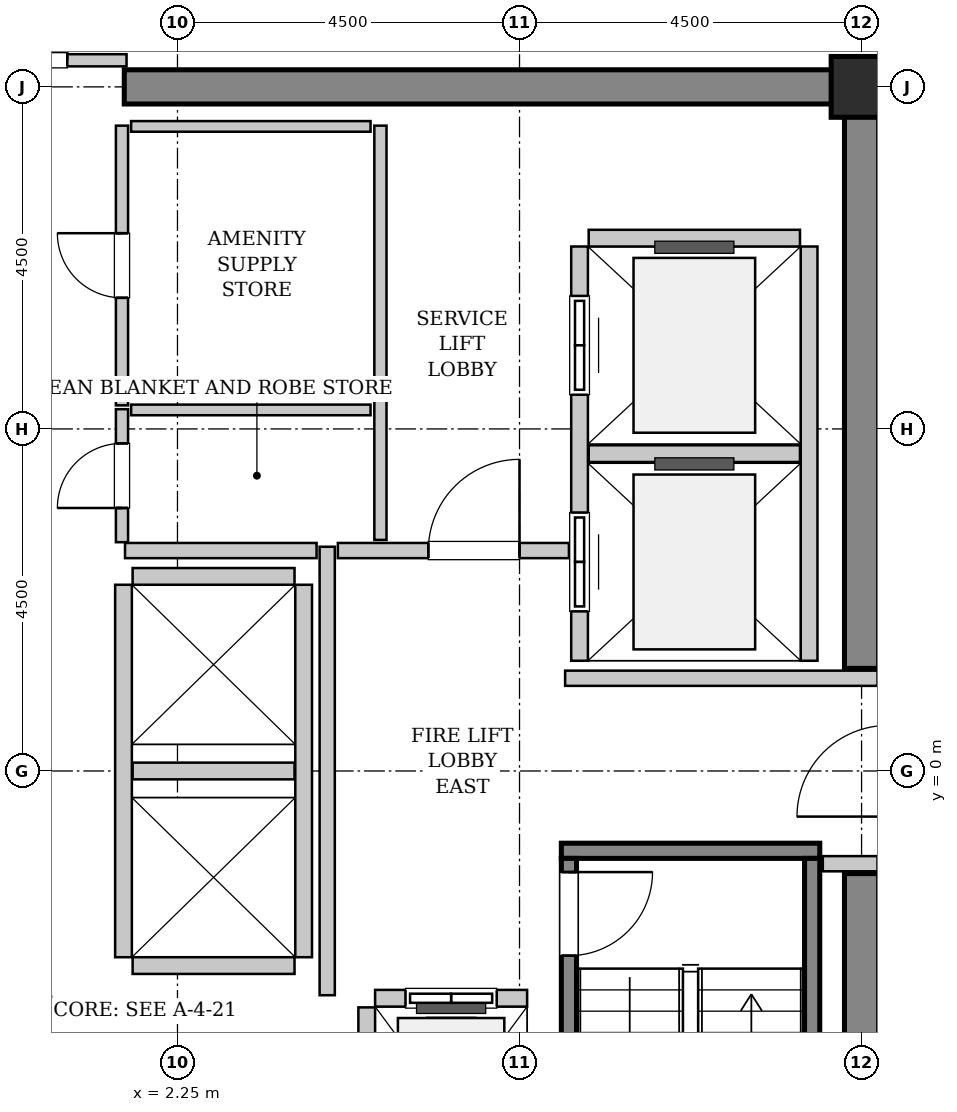
"""IFC4 building model, lengths in metres.
Left out: names, types, materials, properties, quantities, classifications, styles, units other than length and angle.
Written with IfcOpenShell. Run it as: python <this file> out.ifc"""

import sys

from ifc_helpers import new_model, si_unit, direction, frame, frame_2d, origin, origin_2d, place, context, subcontext, project, spatial, rectangle, hollow_rectangle, extrude, source, transform, mapped, element, fill, save


model = new_model("IFC4")
c1 = context("Model", 3, precision=1e-05, world=origin(), true_north=direction((0.0, 1.0)))
c2 = subcontext(c1, "Body", "Model", "MODEL_VIEW")
j1 = project(units=[si_unit("LENGTHUNIT", "METRE"), si_unit("PLANEANGLEUNIT", "RADIAN")], contexts=[c1])
p1 = place(None, origin())
s1 = spatial("IfcSite", under=j1, at=p1, CompositionType="ELEMENT")
p2 = place(p1, origin())
s2 = spatial("IfcBuilding", under=s1, at=p2, CompositionType="ELEMENT")
p3 = place(p2, frame((0.0, 0.0, 264.6)))
s3 = spatial("IfcBuildingStorey", under=s2, at=p3, CompositionType="ELEMENT", Elevation=264.6)
m1 = source(origin(), c2, "Body", "SweptSolid", [
    extrude(rectangle(XDim=9.925, YDim=0.45, at=frame_2d((4.962, 0.0))), origin(), (0.0, 0.0, 1.0), 3.8),
])
p4 = place(p3, frame((1.55, 9.0, 0.0), z_axis=(0.0, 0.0, 1.0), x_axis=(1.0, 0.0, 0.0)))
e1 = element("IfcWall", 1, at=p4, inside=s3, PredefinedType="SHEAR", context=c2, shape_type="MappedRepresentation", body=[
    mapped(m1, transform((0.0, 0.0, 0.0), x_axis=(1.0, 0.0, 0.0), y_axis=(0.0, 1.0, 0.0), z_axis=(0.0, 0.0, 1.0), scale=1.0)),
])
m2 = source(origin(), c2, "Body", "SweptSolid", [
    extrude(rectangle(XDim=7.425, YDim=0.45, at=frame_2d((3.712, 0.0))), origin(), (0.0, 0.0, 1.0), 3.8),
])
for number, where, z_axis, x_axis in (
    (2, (11.25, -8.775, 0.0), (0.0, 0.0, 1.0), (0.0, 1.0, 0.0)),
    (3, (11.25, 1.35, 0.0), (0.0, 0.0, 1.0), (0.0, 1.0, 0.0)),
):
    element("IfcWall", number, at=place(p3, frame(where, z_axis=z_axis, x_axis=x_axis)), inside=s3, PredefinedType="SHEAR", context=c2, shape_type="MappedRepresentation", body=[
        mapped(m2, transform((0.0, 0.0, 0.0), x_axis=(1.0, 0.0, 0.0), y_axis=(0.0, 1.0, 0.0), z_axis=(0.0, 0.0, 1.0), scale=1.0)),
    ])
m3 = source(origin(), c2, "Body", "SweptSolid", [
    extrude(hollow_rectangle(XDim=0.8, YDim=0.8, WallThickness=0.04, InnerFilletRadius=0.04, OuterFilletRadius=0.08, at=origin_2d()), origin(), (0.0, 0.0, 1.0), 3.8),
])
p5 = place(p3, frame((11.25, 9.0, 0.0), z_axis=(0.0, 0.0, 1.0), x_axis=(1.0, 0.0, 0.0)))
e4 = element("IfcColumn", 4, at=p5, inside=s3, PredefinedType="COLUMN", context=c2, shape_type="MappedRepresentation", body=[
    mapped(m3, transform((0.0, 0.0, 0.0), x_axis=(1.0, 0.0, 0.0), y_axis=(0.0, 1.0, 0.0), z_axis=(0.0, 0.0, 1.0), scale=1.0)),
])
m4 = source(origin(), c2, "Body", "SweptSolid", [
    extrude(rectangle(XDim=3.4, YDim=0.2, at=frame_2d((1.7, 0.0))), origin(), (0.0, 0.0, 1.0), 3.8),
])
p6 = place(p3, frame((7.3, -1.05, 0.0), z_axis=(0.0, 0.0, 1.0), x_axis=(1.0, 0.0, 0.0)))
e5 = element("IfcWall", 5, at=p6, inside=s3, PredefinedType="SOLIDWALL", context=c2, shape_type="MappedRepresentation", body=[
    mapped(m4, transform((0.0, 0.0, 0.0), x_axis=(1.0, 0.0, 0.0), y_axis=(0.0, 1.0, 0.0), z_axis=(0.0, 0.0, 1.0), scale=1.0)),
])
m5 = source(origin(), c2, "Body", "SweptSolid", [
    extrude(rectangle(XDim=7.1, YDim=0.2, at=frame_2d((3.55, 0.0))), origin(), (0.0, 0.0, 1.0), 3.8),
])
p7 = place(p3, frame((7.4, -1.15, 0.0), z_axis=(0.0, 0.0, 1.0), x_axis=(0.0, -1.0, 0.0)))
e6 = element("IfcWall", 6, at=p7, inside=s3, PredefinedType="SOLIDWALL", context=c2, shape_type="MappedRepresentation", body=[
    mapped(m5, transform((0.0, 0.0, 0.0), x_axis=(1.0, 0.0, 0.0), y_axis=(0.0, 1.0, 0.0), z_axis=(0.0, 0.0, 1.0), scale=1.0)),
])
p8 = place(p7, frame((0.18, 0.0, 0.0)))
e7 = element("IfcOpeningElement", 7, at=p8, cuts=e6, PredefinedType="OPENING", context=c2, shape_type="SweptSolid", body=[
    extrude(rectangle(XDim=1.1, YDim=2.15, at=frame_2d((0.55, 1.075))), frame((0.0, 0.11, 0.0), z_axis=(0.0, -1.0, 0.0), x_axis=(1.0, 0.0, 0.0)), (0.0, 0.0, 1.0), 0.22),
])
p9 = place(p3, frame((10.6, -1.15, 0.0), z_axis=(0.0, 0.0, 1.0), x_axis=(0.0, -1.0, 0.0)))
e8 = element("IfcWall", 8, at=p9, inside=s3, PredefinedType="SOLIDWALL", context=c2, shape_type="MappedRepresentation", body=[
    mapped(m5, transform((0.0, 0.0, 0.0), x_axis=(1.0, 0.0, 0.0), y_axis=(0.0, 1.0, 0.0), z_axis=(0.0, 0.0, 1.0), scale=1.0)),
])
m6 = source(origin(), c2, "Body", "SweptSolid", [
    extrude(rectangle(XDim=2.0, YDim=0.22, at=frame_2d((1.0, 0.0))), origin(), (0.0, 0.0, 1.0), 3.535),
])
p10 = place(p3, frame((6.85, -2.99, 0.0), z_axis=(0.0, 0.0, 1.0), x_axis=(-1.0, 0.0, 0.0)))
e9 = element("IfcWall", 9, at=p10, inside=s3, PredefinedType="SOLIDWALL", context=c2, shape_type="MappedRepresentation", body=[
    mapped(m6, transform((0.0, 0.0, 0.0), x_axis=(1.0, 0.0, 0.0), y_axis=(0.0, 1.0, 0.0), z_axis=(0.0, 0.0, 1.0), scale=1.0)),
])
p11 = place(p10, frame((0.4, 0.0, 0.0)))
e10 = element("IfcOpeningElement", 10, at=p11, cuts=e9, PredefinedType="OPENING", context=c2, shape_type="SweptSolid", body=[
    extrude(rectangle(XDim=1.2, YDim=2.2, at=frame_2d((0.6, 1.1))), frame((0.0, 0.12, 0.0), z_axis=(0.0, -1.0, 0.0), x_axis=(1.0, 0.0, 0.0)), (0.0, 0.0, 1.0), 0.24),
])
m7 = source(origin(), c2, "Body", "SweptSolid", [
    extrude(rectangle(XDim=2.68, YDim=0.22, at=frame_2d((1.34, 0.0))), origin(), (0.0, 0.0, 1.0), 3.535),
])
p12 = place(p3, frame((4.74, -3.11, 0.0), z_axis=(0.0, 0.0, 1.0), x_axis=(0.0, -1.0, 0.0)))
e11 = element("IfcWall", 11, at=p12, inside=s3, PredefinedType="SOLIDWALL", context=c2, shape_type="MappedRepresentation", body=[
    mapped(m7, transform((0.0, 0.0, 0.0), x_axis=(1.0, 0.0, 0.0), y_axis=(0.0, 1.0, 0.0), z_axis=(0.0, 0.0, 1.0), scale=1.0)),
])
m8 = source(origin(), c2, "Body", "SweptSolid", [
    extrude(rectangle(XDim=5.45, YDim=0.22, at=frame_2d((2.725, 0.0))), origin(), (0.0, 0.0, 1.0), 3.535),
])
p13 = place(p3, frame((7.54, 6.9, 0.0), z_axis=(0.0, 0.0, 1.0), x_axis=(0.0, -1.0, 0.0)))
e12 = element("IfcWall", 12, at=p13, inside=s3, PredefinedType="SOLIDWALL", context=c2, shape_type="MappedRepresentation", body=[
    mapped(m8, transform((0.0, 0.0, 0.0), x_axis=(1.0, 0.0, 0.0), y_axis=(0.0, 1.0, 0.0), z_axis=(0.0, 0.0, 1.0), scale=1.0)),
])
p14 = place(p13, frame((3.5, 0.0, 0.0)))
e13 = element("IfcOpeningElement", 13, at=p14, cuts=e12, PredefinedType="OPENING", context=c2, shape_type="SweptSolid", body=[
    extrude(rectangle(XDim=1.3, YDim=2.3, at=frame_2d((0.65, 1.15))), frame((0.0, 0.12, 0.0), z_axis=(0.0, -1.0, 0.0), x_axis=(1.0, 0.0, 0.0)), (0.0, 0.0, 1.0), 0.24),
])
p15 = place(p13, frame((0.65, 0.0, 0.0)))
e14 = element("IfcOpeningElement", 14, at=p15, cuts=e12, PredefinedType="OPENING", context=c2, shape_type="SweptSolid", body=[
    extrude(rectangle(XDim=1.3, YDim=2.3, at=frame_2d((0.65, 1.15))), frame((0.0, 0.12, 0.0), z_axis=(0.0, -1.0, 0.0), x_axis=(1.0, 0.0, 0.0)), (0.0, 0.0, 1.0), 0.24),
])
p16 = place(p3, frame((10.56, 1.45, 0.0), z_axis=(0.0, 0.0, 1.0), x_axis=(0.0, 1.0, 0.0)))
e15 = element("IfcWall", 15, at=p16, inside=s3, PredefinedType="SOLIDWALL", context=c2, shape_type="MappedRepresentation", body=[
    mapped(m8, transform((0.0, 0.0, 0.0), x_axis=(1.0, 0.0, 0.0), y_axis=(0.0, 1.0, 0.0), z_axis=(0.0, 0.0, 1.0), scale=1.0)),
])
m9 = source(origin(), c2, "Body", "SweptSolid", [
    extrude(rectangle(XDim=2.78, YDim=0.22, at=frame_2d((1.39, 0.0))), origin(), (0.0, 0.0, 1.0), 3.535),
])
for number, where, z_axis, x_axis in (
    (16, (7.66, 4.175, 0.0), (0.0, 0.0, 1.0), (1.0, 0.0, 0.0)),
    (17, (10.44, 7.01, 0.0), (0.0, 0.0, 1.0), (-1.0, 0.0, 0.0)),
):
    element("IfcWall", number, at=place(p3, frame(where, z_axis=z_axis, x_axis=x_axis)), inside=s3, PredefinedType="SOLIDWALL", context=c2, shape_type="MappedRepresentation", body=[
        mapped(m9, transform((0.0, 0.0, 0.0), x_axis=(1.0, 0.0, 0.0), y_axis=(0.0, 1.0, 0.0), z_axis=(0.0, 0.0, 1.0), scale=1.0)),
    ])
m10 = source(origin(), c2, "Body", "SweptSolid", [
    extrude(rectangle(XDim=4.9, YDim=0.22, at=frame_2d((2.45, 0.0))), origin(), (0.0, 0.0, 1.0), 3.535),
])
for number, where, z_axis, x_axis in (
    (18, (1.54, 2.45, 0.0), (0.0, 0.0, 1.0), (0.0, -1.0, 0.0)),
    (19, (3.91, -2.45, 0.0), (0.0, 0.0, 1.0), (0.0, 1.0, 0.0)),
):
    element("IfcWall", number, at=place(p3, frame(where, z_axis=z_axis, x_axis=x_axis)), inside=s3, PredefinedType="SOLIDWALL", context=c2, shape_type="MappedRepresentation", body=[
        mapped(m10, transform((0.0, 0.0, 0.0), x_axis=(1.0, 0.0, 0.0), y_axis=(0.0, 1.0, 0.0), z_axis=(0.0, 0.0, 1.0), scale=1.0)),
    ])
m11 = source(origin(), c2, "Body", "SweptSolid", [
    extrude(rectangle(XDim=2.13, YDim=0.22, at=frame_2d((1.065, 0.0))), origin(), (0.0, 0.0, 1.0), 3.535),
])
for number, where, z_axis, x_axis in (
    (20, (1.66, -2.56, 0.0), (0.0, 0.0, 1.0), (1.0, 0.0, 0.0)),
    (21, (1.66, 0.0, 0.0), (0.0, 0.0, 1.0), (1.0, 0.0, 0.0)),
    (22, (3.79, 2.56, 0.0), (0.0, 0.0, 1.0), (-1.0, 0.0, 0.0)),
):
    element("IfcWall", number, at=place(p3, frame(where, z_axis=z_axis, x_axis=x_axis)), inside=s3, PredefinedType="SOLIDWALL", context=c2, shape_type="MappedRepresentation", body=[
        mapped(m11, transform((0.0, 0.0, 0.0), x_axis=(1.0, 0.0, 0.0), y_axis=(0.0, 1.0, 0.0), z_axis=(0.0, 0.0, 1.0), scale=1.0)),
    ])
m12 = source(origin(), c2, "Body", "SweptSolid", [
    extrude(rectangle(XDim=5.9, YDim=0.2, at=frame_2d((2.95, 0.0))), origin(), (0.0, 0.0, 1.0), 3.535),
])
p17 = place(p3, frame((4.22, -2.95, 0.0), z_axis=(0.0, 0.0, 1.0), x_axis=(0.0, 1.0, 0.0)))
e23 = element("IfcWall", 23, at=p17, inside=s3, PredefinedType="PARTITIONING", context=c2, shape_type="MappedRepresentation", body=[
    mapped(m12, transform((0.0, 0.0, 0.0), x_axis=(1.0, 0.0, 0.0), y_axis=(0.0, 1.0, 0.0), z_axis=(0.0, 0.0, 1.0), scale=1.0)),
])
m13 = source(origin(), c2, "Body", "SweptSolid", [
    extrude(rectangle(XDim=2.52, YDim=0.2, at=frame_2d((1.26, 0.0))), origin(), (0.0, 0.0, 1.0), 3.535),
])
p18 = place(p3, frame((1.56, 2.9, 0.0), z_axis=(0.0, 0.0, 1.0), x_axis=(1.0, 0.0, 0.0)))
e24 = element("IfcWall", 24, at=p18, inside=s3, PredefinedType="PARTITIONING", context=c2, shape_type="MappedRepresentation", body=[
    mapped(m13, transform((0.0, 0.0, 0.0), x_axis=(1.0, 0.0, 0.0), y_axis=(0.0, 1.0, 0.0), z_axis=(0.0, 0.0, 1.0), scale=1.0)),
])
m14 = source(origin(), c2, "Body", "SweptSolid", [
    extrude(rectangle(XDim=3.04, YDim=0.2, at=frame_2d((1.52, 0.0))), origin(), (0.0, 0.0, 1.0), 3.535),
])
p19 = place(p3, frame((4.36, 2.9, 0.0), z_axis=(0.0, 0.0, 1.0), x_axis=(1.0, 0.0, 0.0)))
e25 = element("IfcWall", 25, at=p19, inside=s3, PredefinedType="PARTITIONING", context=c2, shape_type="MappedRepresentation", body=[
    mapped(m14, transform((0.0, 0.0, 0.0), x_axis=(1.0, 0.0, 0.0), y_axis=(0.0, 1.0, 0.0), z_axis=(0.0, 0.0, 1.0), scale=1.0)),
])
p20 = place(p19, frame((1.19, 0.0, 0.0)))
e26 = element("IfcOpeningElement", 26, at=p20, cuts=e25, PredefinedType="OPENING", context=c2, shape_type="SweptSolid", body=[
    extrude(rectangle(XDim=1.2, YDim=2.15, at=frame_2d((0.6, 1.075))), frame((0.0, 0.11, 0.0), z_axis=(0.0, -1.0, 0.0), x_axis=(1.0, 0.0, 0.0)), (0.0, 0.0, 1.0), 0.22),
])
m15 = source(origin(), c2, "Body", "SweptSolid", [
    extrude(rectangle(XDim=4.11, YDim=0.2, at=frame_2d((2.055, 0.0))), origin(), (0.0, 0.0, 1.0), 3.535),
])
p21 = place(p3, frame((7.35, 1.22, 0.0), z_axis=(0.0, 0.0, 1.0), x_axis=(1.0, 0.0, 0.0)))
e27 = element("IfcWall", 27, at=p21, inside=s3, PredefinedType="PARTITIONING", context=c2, shape_type="MappedRepresentation", body=[
    mapped(m15, transform((0.0, 0.0, 0.0), x_axis=(1.0, 0.0, 0.0), y_axis=(0.0, 1.0, 0.0), z_axis=(0.0, 0.0, 1.0), scale=1.0)),
])
m16 = source(origin(), c2, "Body", "SweptSolid", [
    extrude(rectangle(XDim=0.72, YDim=0.2, at=frame_2d((0.36, 0.0))), origin(), (0.0, 0.0, 1.0), 3.535),
])
p22 = place(p3, frame((10.74, -1.22, 0.0), z_axis=(0.0, 0.0, 1.0), x_axis=(1.0, 0.0, 0.0)))
e28 = element("IfcWall", 28, at=p22, inside=s3, PredefinedType="PARTITIONING", context=c2, shape_type="MappedRepresentation", body=[
    mapped(m16, transform((0.0, 0.0, 0.0), x_axis=(1.0, 0.0, 0.0), y_axis=(0.0, 1.0, 0.0), z_axis=(0.0, 0.0, 1.0), scale=1.0)),
])
m17 = source(origin(), c2, "Body", "SweptSolid", [
    extrude(rectangle(XDim=3.16, YDim=0.16, at=frame_2d((1.58, 0.0))), origin(), (0.0, 0.0, 1.0), 2.625),
])
p23 = place(p3, frame((-1.58, 9.35, 0.0), z_axis=(0.0, 0.0, 1.0), x_axis=(1.0, 0.0, 0.0)))
e29 = element("IfcWall", 29, at=p23, inside=s3, PredefinedType="PARTITIONING", context=c2, shape_type="MappedRepresentation", body=[
    mapped(m17, transform((0.0, 0.0, 0.0), x_axis=(1.0, 0.0, 0.0), y_axis=(0.0, 1.0, 0.0), z_axis=(0.0, 0.0, 1.0), scale=1.0)),
])
p24 = place(p23, frame((0.78, 0.0, 0.0)))
e30 = element("IfcOpeningElement", 30, at=p24, cuts=e29, PredefinedType="OPENING", context=c2, shape_type="SweptSolid", body=[
    extrude(rectangle(XDim=1.6, YDim=2.3, at=frame_2d((0.8, 1.15))), frame((0.0, 0.09, 0.0), z_axis=(0.0, -1.0, 0.0), x_axis=(1.0, 0.0, 0.0)), (0.0, 0.0, 1.0), 0.18),
])
m18 = source(origin(), c2, "Body", "SweptSolid", [
    extrude(rectangle(XDim=5.45, YDim=0.16, at=frame_2d((2.725, 0.0))), origin(), (0.0, 0.0, 1.0), 3.535),
])
p25 = place(p3, frame((4.92, 3.04, 0.0), z_axis=(0.0, 0.0, 1.0), x_axis=(0.0, 1.0, 0.0)))
e31 = element("IfcWall", 31, at=p25, inside=s3, PredefinedType="PARTITIONING", context=c2, shape_type="MappedRepresentation", body=[
    mapped(m18, transform((0.0, 0.0, 0.0), x_axis=(1.0, 0.0, 0.0), y_axis=(0.0, 1.0, 0.0), z_axis=(0.0, 0.0, 1.0), scale=1.0)),
])
m19 = source(origin(), c2, "Body", "SweptSolid", [
    extrude(rectangle(XDim=1.75, YDim=0.16, at=frame_2d((0.875, 0.0))), origin(), (0.0, 0.0, 1.0), 3.535),
])
p26 = place(p3, frame((1.52, 3.01, 0.0), z_axis=(0.0, 0.0, 1.0), x_axis=(0.0, 1.0, 0.0)))
e32 = element("IfcWall", 32, at=p26, inside=s3, PredefinedType="PARTITIONING", context=c2, shape_type="MappedRepresentation", body=[
    mapped(m19, transform((0.0, 0.0, 0.0), x_axis=(1.0, 0.0, 0.0), y_axis=(0.0, 1.0, 0.0), z_axis=(0.0, 0.0, 1.0), scale=1.0)),
])
p27 = place(p26, frame((0.45, 0.0, 0.0)))
e33 = element("IfcOpeningElement", 33, at=p27, cuts=e32, PredefinedType="OPENING", context=c2, shape_type="SweptSolid", body=[
    extrude(rectangle(XDim=0.85, YDim=2.1, at=frame_2d((0.425, 1.05))), frame((0.0, 0.09, 0.0), z_axis=(0.0, -1.0, 0.0), x_axis=(1.0, 0.0, 0.0)), (0.0, 0.0, 1.0), 0.18),
])
m20 = source(origin(), c2, "Body", "SweptSolid", [
    extrude(rectangle(XDim=3.15, YDim=0.14, at=frame_2d((1.575, 0.0))), origin(), (0.0, 0.0, 1.0), 3.535),
])
p28 = place(p3, frame((1.64, 4.75, 0.0), z_axis=(0.0, 0.0, 1.0), x_axis=(1.0, 0.0, 0.0)))
e34 = element("IfcWall", 34, at=p28, inside=s3, PredefinedType="PARTITIONING", context=c2, shape_type="MappedRepresentation", body=[
    mapped(m20, transform((0.0, 0.0, 0.0), x_axis=(1.0, 0.0, 0.0), y_axis=(0.0, 1.0, 0.0), z_axis=(0.0, 0.0, 1.0), scale=1.0)),
])
m21 = source(origin(), c2, "Body", "SweptSolid", [
    extrude(rectangle(XDim=3.68, YDim=0.16, at=frame_2d((1.84, 0.0))), origin(), (0.0, 0.0, 1.0), 3.535),
])
p29 = place(p3, frame((1.52, 4.81, 0.0), z_axis=(0.0, 0.0, 1.0), x_axis=(0.0, 1.0, 0.0)))
e35 = element("IfcWall", 35, at=p29, inside=s3, PredefinedType="PARTITIONING", context=c2, shape_type="MappedRepresentation", body=[
    mapped(m21, transform((0.0, 0.0, 0.0), x_axis=(1.0, 0.0, 0.0), y_axis=(0.0, 1.0, 0.0), z_axis=(0.0, 0.0, 1.0), scale=1.0)),
])
p30 = place(p29, frame((1.415, 0.0, 0.0)))
e36 = element("IfcOpeningElement", 36, at=p30, cuts=e35, PredefinedType="OPENING", context=c2, shape_type="SweptSolid", body=[
    extrude(rectangle(XDim=0.85, YDim=2.1, at=frame_2d((0.425, 1.05))), frame((0.0, 0.09, 0.0), z_axis=(0.0, -1.0, 0.0), x_axis=(1.0, 0.0, 0.0)), (0.0, 0.0, 1.0), 0.18),
])
p31 = place(p3, frame((1.64, 8.48, 0.0), z_axis=(0.0, 0.0, 1.0), x_axis=(1.0, 0.0, 0.0)))
e37 = element("IfcWall", 37, at=p31, inside=s3, PredefinedType="PARTITIONING", context=c2, shape_type="MappedRepresentation", body=[
    mapped(m20, transform((0.0, 0.0, 0.0), x_axis=(1.0, 0.0, 0.0), y_axis=(0.0, 1.0, 0.0), z_axis=(0.0, 0.0, 1.0), scale=1.0)),
])
m22 = source(origin(), c2, "Body", "SweptSolid", [
    extrude(rectangle(XDim=1.1, YDim=2.15, at=frame_2d((0.55, 1.075))), frame((0.0, 0.025, 0.0), z_axis=(0.0, -1.0, 0.0), x_axis=(1.0, 0.0, 0.0)), (0.0, 0.0, 1.0), 0.05),
])
p32 = place(p8, origin())
e38 = element("IfcDoor", 38, at=p32, inside=s3, OperationType="SINGLE_SWING_LEFT", PredefinedType="DOOR", context=c2, shape_type="MappedRepresentation", body=[
    mapped(m22, transform((0.0, 0.0, 0.0), x_axis=(1.0, 0.0, 0.0), y_axis=(0.0, 1.0, 0.0), z_axis=(0.0, 0.0, 1.0), scale=1.0)),
])
fill(e7, e38)
m23 = source(origin(), c2, "Body", "SweptSolid", [
    extrude(rectangle(XDim=1.2, YDim=2.2, at=frame_2d((0.6, 1.1))), frame((0.0, 0.025, 0.0), z_axis=(0.0, -1.0, 0.0), x_axis=(1.0, 0.0, 0.0)), (0.0, 0.0, 1.0), 0.05),
])
p33 = place(p11, origin())
e39 = element("IfcDoor", 39, at=p33, inside=s3, OperationType="SLIDING_TO_LEFT", PredefinedType="DOOR", context=c2, shape_type="MappedRepresentation", body=[
    mapped(m23, transform((0.0, 0.0, 0.0), x_axis=(1.0, 0.0, 0.0), y_axis=(0.0, 1.0, 0.0), z_axis=(0.0, 0.0, 1.0), scale=1.0)),
])
fill(e10, e39)
m24 = source(origin(), c2, "Body", "SweptSolid", [
    extrude(rectangle(XDim=1.3, YDim=2.3, at=frame_2d((0.65, 1.15))), frame((0.0, 0.025, 0.0), z_axis=(0.0, -1.0, 0.0), x_axis=(1.0, 0.0, 0.0)), (0.0, 0.0, 1.0), 0.05),
])
p34 = place(p14, origin())
e40 = element("IfcDoor", 40, at=p34, inside=s3, OperationType="SLIDING_TO_RIGHT", PredefinedType="DOOR", context=c2, shape_type="MappedRepresentation", body=[
    mapped(m24, transform((0.0, 0.0, 0.0), x_axis=(1.0, 0.0, 0.0), y_axis=(0.0, 1.0, 0.0), z_axis=(0.0, 0.0, 1.0), scale=1.0)),
])
fill(e13, e40)
p35 = place(p15, origin())
e41 = element("IfcDoor", 41, at=p35, inside=s3, OperationType="SLIDING_TO_RIGHT", PredefinedType="DOOR", context=c2, shape_type="MappedRepresentation", body=[
    mapped(m24, transform((0.0, 0.0, 0.0), x_axis=(1.0, 0.0, 0.0), y_axis=(0.0, 1.0, 0.0), z_axis=(0.0, 0.0, 1.0), scale=1.0)),
])
fill(e14, e41)
m25 = source(origin(), c2, "Body", "SweptSolid", [
    extrude(rectangle(XDim=1.2, YDim=2.15, at=frame_2d((0.6, 1.075))), frame((0.0, 0.025, 0.0), z_axis=(0.0, -1.0, 0.0), x_axis=(1.0, 0.0, 0.0)), (0.0, 0.0, 1.0), 0.05),
])
p36 = place(p20, origin())
e42 = element("IfcDoor", 42, at=p36, inside=s3, OperationType="SINGLE_SWING_RIGHT", PredefinedType="DOOR", context=c2, shape_type="MappedRepresentation", body=[
    mapped(m25, transform((0.0, 0.0, 0.0), x_axis=(1.0, 0.0, 0.0), y_axis=(0.0, 1.0, 0.0), z_axis=(0.0, 0.0, 1.0), scale=1.0)),
])
fill(e26, e42)
m26 = source(origin(), c2, "Body", "SweptSolid", [
    extrude(rectangle(XDim=1.6, YDim=2.3, at=frame_2d((0.8, 1.15))), frame((0.0, 0.025, 0.0), z_axis=(0.0, -1.0, 0.0), x_axis=(1.0, 0.0, 0.0)), (0.0, 0.0, 1.0), 0.05),
])
p37 = place(p24, origin())
e43 = element("IfcDoor", 43, at=p37, inside=s3, OperationType="DOUBLE_DOOR_SINGLE_SWING", PredefinedType="DOOR", context=c2, shape_type="MappedRepresentation", body=[
    mapped(m26, transform((0.0, 0.0, 0.0), x_axis=(1.0, 0.0, 0.0), y_axis=(0.0, 1.0, 0.0), z_axis=(0.0, 0.0, 1.0), scale=1.0)),
])
fill(e30, e43)
m27 = source(origin(), c2, "Body", "SweptSolid", [
    extrude(rectangle(XDim=0.85, YDim=2.1, at=frame_2d((0.425, 1.05))), frame((0.0, 0.025, 0.0), z_axis=(0.0, -1.0, 0.0), x_axis=(1.0, 0.0, 0.0)), (0.0, 0.0, 1.0), 0.05),
])
p38 = place(p27, origin())
e44 = element("IfcDoor", 44, at=p38, inside=s3, OperationType="SINGLE_SWING_LEFT", PredefinedType="DOOR", context=c2, shape_type="MappedRepresentation", body=[
    mapped(m27, transform((0.0, 0.0, 0.0), x_axis=(1.0, 0.0, 0.0), y_axis=(0.0, 1.0, 0.0), z_axis=(0.0, 0.0, 1.0), scale=1.0)),
])
fill(e33, e44)
p39 = place(p30, origin())
e45 = element("IfcDoor", 45, at=p39, inside=s3, OperationType="SINGLE_SWING_RIGHT", PredefinedType="DOOR", context=c2, shape_type="MappedRepresentation", body=[
    mapped(m27, transform((0.0, 0.0, 0.0), x_axis=(1.0, 0.0, 0.0), y_axis=(0.0, 1.0, 0.0), z_axis=(0.0, 0.0, 1.0), scale=1.0)),
])
fill(e36, e45)
save(model, sys.argv[1])
